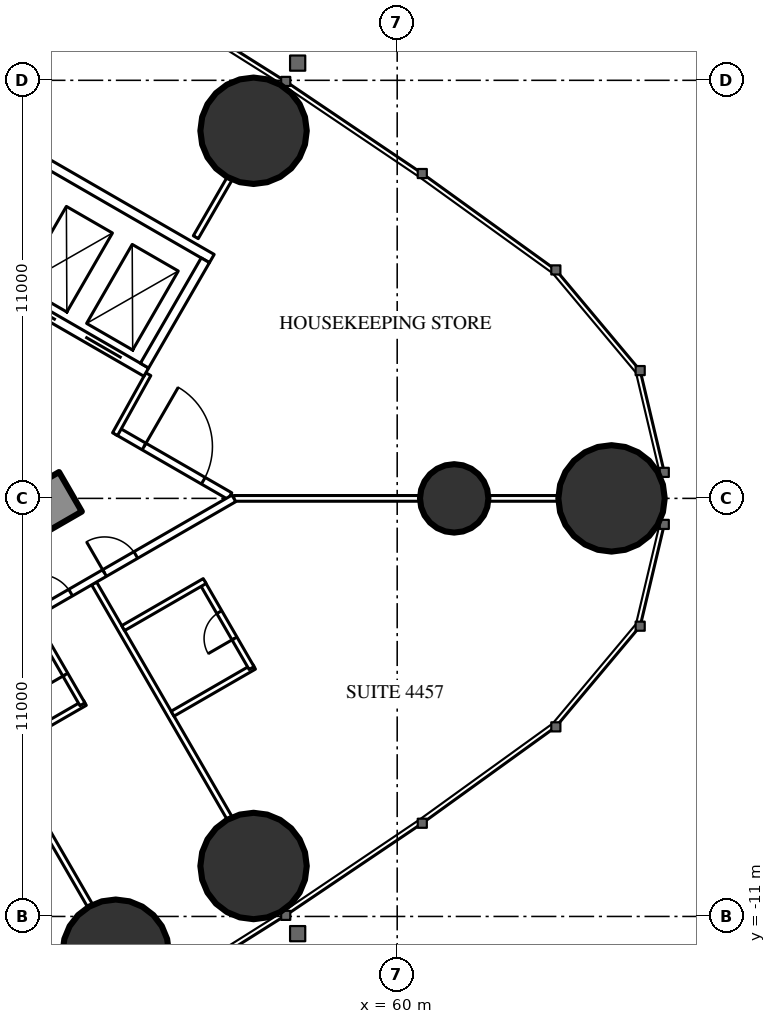
"""IFC4 building model, lengths in metres.
Left out: names, types, materials, properties, quantities, classifications, styles, units other than length and angle.
Written with IfcOpenShell. Run it as: python <this file> out.ifc"""

import sys

from ifc_helpers import new_model, si_unit, direction, frame, frame_2d, origin, origin_2d, place, context, subcontext, project, spatial, rectangle, circle, extrude, element, fill, save


model = new_model("IFC4")
c1 = context("Model", 3, precision=1e-05, world=origin(), true_north=direction((0.0, 1.0)))
c2 = subcontext(c1, "Body", "Model", "MODEL_VIEW")
j1 = project(units=[si_unit("LENGTHUNIT", "METRE"), si_unit("PLANEANGLEUNIT", "RADIAN")], contexts=[c1])
p1 = place(None, origin())
s1 = spatial("IfcSite", under=j1, at=p1, CompositionType="ELEMENT")
p2 = place(p1, origin())
s2 = spatial("IfcBuilding", under=s1, at=p2, CompositionType="ELEMENT")
p3 = place(p2, frame((0.0, 0.0, 166.8)))
s3 = spatial("IfcBuildingStorey", under=s2, at=p3, CompositionType="ELEMENT", Elevation=166.8)
for number, where, z_axis, x_axis in (
    (1, (65.64, 0.0, 0.0), (0.0, 0.0, 1.0), (1.0, 0.0, 0.0)),
    (2, (56.221, 9.672, 0.0), (0.0, 0.0, 1.0), (1.0, 0.0, 0.0)),
    (3, (52.594, -11.955, 0.0), (0.0, 0.0, 1.0), (1.0, 0.0, 0.0)),
    (4, (56.221, -9.672, 0.0), (0.0, 0.0, 1.0), (1.0, 0.0, 0.0)),
):
    element("IfcColumn", number, at=place(p3, frame(where, z_axis=z_axis, x_axis=x_axis)), inside=s3, PredefinedType="COLUMN", context=c2, shape_type="SweptSolid", body=[
        extrude(circle(Radius=1.4, at=origin_2d()), origin(), (0.0, 0.0, 1.0), 3.5),
    ])
p4 = place(p3, frame((61.5, 0.0, 0.0), z_axis=(0.0, 0.0, 1.0), x_axis=(1.0, 0.0, 0.0)))
e5 = element("IfcColumn", 5, at=p4, inside=s3, PredefinedType="COLUMN", context=c2, shape_type="SweptSolid", body=[
    extrude(circle(Radius=0.9, at=origin_2d()), origin(), (0.0, 0.0, 1.0), 3.5),
])
p5 = place(p3, frame((27.2, -13.8, 0.0), z_axis=(0.0, 0.0, 1.0), x_axis=(0.866027159892, 0.499996958321, 0.0)))
e6 = element("IfcWall", 6, at=p5, inside=s3, PredefinedType="SHEAR", context=c2, shape_type="SweptSolid", body=[
    extrude(rectangle(XDim=27.947, YDim=1.2, at=frame_2d((13.973, 0.0))), origin(), (0.0, 0.0, 1.0), 3.5),
])
p6 = place(p5, frame((4.6, 0.0, 0.0)))
e7 = element("IfcOpeningElement", 7, at=p6, cuts=e6, PredefinedType="OPENING", context=c2, shape_type="SweptSolid", body=[
    extrude(rectangle(XDim=1.0, YDim=2.2, at=frame_2d((0.5, 1.1))), frame((0.0, 0.61, 0.0), z_axis=(0.0, -1.0, 0.0), x_axis=(1.0, 0.0, 0.0)), (0.0, 0.0, 1.0), 1.22),
])
p7 = place(p5, frame((13.395, 0.0, 0.0)))
e8 = element("IfcOpeningElement", 8, at=p7, cuts=e6, PredefinedType="OPENING", context=c2, shape_type="SweptSolid", body=[
    extrude(rectangle(XDim=1.8, YDim=2.2, at=frame_2d((0.9, 1.1))), frame((0.0, 0.61, 0.0), z_axis=(0.0, -1.0, 0.0), x_axis=(1.0, 0.0, 0.0)), (0.0, 0.0, 1.0), 1.22),
])
p8 = place(p3, frame((48.275, -4.404, 0.0), z_axis=(0.0, 0.0, 1.0), x_axis=(0.500006004368, -0.866021937133, 0.0)))
e9 = element("IfcWall", 9, at=p8, inside=s3, PredefinedType="PARTITIONING", context=c2, shape_type="SweptSolid", body=[
    extrude(rectangle(XDim=7.279, YDim=0.15, at=frame_2d((3.64, 0.0))), origin(), (0.0, 0.0, 1.0), 2.3),
])
p9 = place(p3, frame((52.025, -2.238, 0.0), z_axis=(0.0, 0.0, 1.0), x_axis=(0.499983785035, -0.866034765296, 0.0)))
e10 = element("IfcWall", 10, at=p9, inside=s3, PredefinedType="PARTITIONING", context=c2, shape_type="SweptSolid", body=[
    extrude(rectangle(XDim=7.116, YDim=0.15, at=frame_2d((3.558, 0.0))), origin(), (0.0, 0.0, 1.0), 2.3),
])
p10 = place(p3, frame((55.702, 0.0, 0.0), z_axis=(0.0, 0.0, 1.0), x_axis=(1.0, 0.0, 0.0)))
e11 = element("IfcWall", 11, at=p10, inside=s3, PredefinedType="PARTITIONING", context=c2, shape_type="SweptSolid", body=[
    extrude(rectangle(XDim=8.518, YDim=0.15, at=frame_2d((4.259, 0.0))), origin(), (0.0, 0.0, 1.0), 2.3),
])
p11 = place(p3, frame((54.7, 6.872, 0.0), z_axis=(0.0, 0.0, 1.0), x_axis=(0.499989690894, 0.866031355668, 0.0)))
e12 = element("IfcWall", 12, at=p11, inside=s3, PredefinedType="PARTITIONING", context=c2, shape_type="SweptSolid", body=[
    extrude(rectangle(XDim=1.766, YDim=0.15, at=frame_2d((0.883, 0.0))), origin(), (0.0, 0.0, 1.0), 3.25),
])
p12 = place(p3, frame((52.639, 1.769, 0.0), z_axis=(0.0, 0.0, 1.0), x_axis=(0.866027340901, -0.4999966448, 0.0)))
e13 = element("IfcWall", 13, at=p12, inside=s3, PredefinedType="PARTITIONING", context=c2, shape_type="SweptSolid", body=[
    extrude(rectangle(XDim=3.417, YDim=0.2, at=frame_2d((1.708, 0.0))), origin(), (0.0, 0.0, 1.0), 3.25),
])
p13 = place(p12, frame((0.809, 0.0, 0.0)))
e14 = element("IfcOpeningElement", 14, at=p13, cuts=e13, PredefinedType="OPENING", context=c2, shape_type="SweptSolid", body=[
    extrude(rectangle(XDim=1.8, YDim=2.2, at=frame_2d((0.9, 1.1))), frame((0.0, 0.11, 0.0), z_axis=(0.0, -1.0, 0.0), x_axis=(1.0, 0.0, 0.0)), (0.0, 0.0, 1.0), 0.22),
])
p14 = place(p3, frame((52.576, 1.689, 0.0), z_axis=(0.0, 0.0, 1.0), x_axis=(0.485424724123, 0.874278466629, 0.0)))
e15 = element("IfcWall", 15, at=p14, inside=s3, PredefinedType="PARTITIONING", context=c2, shape_type="SweptSolid", body=[
    extrude(rectangle(XDim=1.805, YDim=0.15, at=frame_2d((0.903, 0.0))), origin(), (0.0, 0.0, 1.0), 3.25),
])
p15 = place(p3, frame((40.741, -8.638, 0.0), z_axis=(0.0, 0.0, 1.0), x_axis=(0.866022967338, 0.500004220025, 0.0)))
e16 = element("IfcWall", 16, at=p15, inside=s3, PredefinedType="PARTITIONING", context=c2, shape_type="SweptSolid", body=[
    extrude(rectangle(XDim=17.276, YDim=0.2, at=frame_2d((8.638, 0.0))), origin(), (0.0, 0.0, 1.0), 3.25),
])
p16 = place(p15, frame((7.316, 0.0, 0.0)))
e17 = element("IfcOpeningElement", 17, at=p16, cuts=e16, PredefinedType="OPENING", context=c2, shape_type="SweptSolid", body=[
    extrude(rectangle(XDim=0.95, YDim=2.2, at=frame_2d((0.475, 1.1))), frame((0.0, 0.11, 0.0), z_axis=(0.0, -1.0, 0.0), x_axis=(1.0, 0.0, 0.0)), (0.0, 0.0, 1.0), 0.22),
])
p17 = place(p15, frame((11.366, 0.0, 0.0)))
e18 = element("IfcOpeningElement", 18, at=p17, cuts=e16, PredefinedType="OPENING", context=c2, shape_type="SweptSolid", body=[
    extrude(rectangle(XDim=0.95, YDim=2.2, at=frame_2d((0.475, 1.1))), frame((0.0, 0.11, 0.0), z_axis=(0.0, -1.0, 0.0), x_axis=(1.0, 0.0, 0.0)), (0.0, 0.0, 1.0), 0.22),
])
p18 = place(p15, frame((13.347, 0.0, 0.0)))
e19 = element("IfcOpeningElement", 19, at=p18, cuts=e16, PredefinedType="OPENING", context=c2, shape_type="SweptSolid", body=[
    extrude(rectangle(XDim=0.95, YDim=2.2, at=frame_2d((0.475, 1.1))), frame((0.0, 0.11, 0.0), z_axis=(0.0, -1.0, 0.0), x_axis=(1.0, 0.0, 0.0)), (0.0, 0.0, 1.0), 0.22),
])
p19 = place(p3, frame((49.64, -6.618, 0.0), z_axis=(0.0, 0.0, 1.0), x_axis=(0.866006523861, 0.500032699561, 0.0)))
e20 = element("IfcWall", 20, at=p19, inside=s3, PredefinedType="PARTITIONING", context=c2, shape_type="SweptSolid", body=[
    extrude(rectangle(XDim=2.475, YDim=0.15, at=frame_2d((1.237, 0.0))), origin(), (0.0, 0.0, 1.0), 3.25),
])
p20 = place(p3, frame((50.418, -3.166, 0.0), z_axis=(0.0, 0.0, 1.0), x_axis=(0.499936506574, -0.866062058628, 0.0)))
e21 = element("IfcWall", 21, at=p20, inside=s3, PredefinedType="PARTITIONING", context=c2, shape_type="SweptSolid", body=[
    extrude(rectangle(XDim=2.6, YDim=0.15, at=frame_2d((1.3, 0.0))), origin(), (0.0, 0.0, 1.0), 3.25),
])
p21 = place(p20, frame((0.9, 0.0, 0.0)))
e22 = element("IfcOpeningElement", 22, at=p21, cuts=e21, PredefinedType="OPENING", context=c2, shape_type="SweptSolid", body=[
    extrude(rectangle(XDim=0.8, YDim=2.2, at=frame_2d((0.4, 1.1))), frame((0.0, 0.085, 0.0), z_axis=(0.0, -1.0, 0.0), x_axis=(1.0, 0.0, 0.0)), (0.0, 0.0, 1.0), 0.17),
])
p22 = place(p3, frame((54.09, -5.665, 0.0), z_axis=(0.0, 0.0, 1.0), x_axis=(0.866006523861, 0.500032699561, 0.0)))
e23 = element("IfcWall", 23, at=p22, inside=s3, PredefinedType="PARTITIONING", context=c2, shape_type="SweptSolid", body=[
    extrude(rectangle(XDim=2.475, YDim=0.15, at=frame_2d((1.237, 0.0))), origin(), (0.0, 0.0, 1.0), 3.25),
])
p23 = place(p3, frame((54.869, -2.213, 0.0), z_axis=(0.0, 0.0, 1.0), x_axis=(0.500047596559, -0.865997922154, 0.0)))
e24 = element("IfcWall", 24, at=p23, inside=s3, PredefinedType="PARTITIONING", context=c2, shape_type="SweptSolid", body=[
    extrude(rectangle(XDim=2.6, YDim=0.15, at=frame_2d((1.3, 0.0))), origin(), (0.0, 0.0, 1.0), 3.25),
])
p24 = place(p23, frame((0.9, 0.0, 0.0)))
e25 = element("IfcOpeningElement", 25, at=p24, cuts=e24, PredefinedType="OPENING", context=c2, shape_type="SweptSolid", body=[
    extrude(rectangle(XDim=0.8, YDim=2.2, at=frame_2d((0.4, 1.1))), frame((0.0, 0.085, 0.0), z_axis=(0.0, -1.0, 0.0), x_axis=(1.0, 0.0, 0.0)), (0.0, 0.0, 1.0), 0.17),
])
p25 = place(p3, frame((52.79, -3.413, 0.0), z_axis=(0.0, 0.0, 1.0), x_axis=(0.866006523861, 0.500032699561, 0.0)))
e26 = element("IfcWall", 26, at=p25, inside=s3, PredefinedType="PARTITIONING", context=c2, shape_type="SweptSolid", body=[
    extrude(rectangle(XDim=2.475, YDim=0.15, at=frame_2d((1.237, 0.0))), origin(), (0.0, 0.0, 1.0), 3.25),
])
p26 = place(p3, frame((47.681, 6.622, 0.0), z_axis=(0.0, 0.0, 1.0), x_axis=(0.86603344179, -0.499986077507, 0.0)))
e27 = element("IfcWall", 27, at=p26, inside=s3, PredefinedType="PARTITIONING", context=c2, shape_type="SweptSolid", body=[
    extrude(rectangle(XDim=6.6, YDim=0.25, at=frame_2d((3.3, 0.0))), origin(), (0.0, 0.0, 1.0), 3.25),
])
p27 = place(p26, frame((0.75, 0.0, 0.0)))
e28 = element("IfcOpeningElement", 28, at=p27, cuts=e27, PredefinedType="OPENING", context=c2, shape_type="SweptSolid", body=[
    extrude(rectangle(XDim=1.1, YDim=2.2, at=frame_2d((0.55, 1.1))), frame((0.0, 0.135, 0.0), z_axis=(0.0, -1.0, 0.0), x_axis=(1.0, 0.0, 0.0)), (0.0, 0.0, 1.0), 0.27),
])
p28 = place(p26, frame((2.75, 0.0, 0.0)))
e29 = element("IfcOpeningElement", 29, at=p28, cuts=e27, PredefinedType="OPENING", context=c2, shape_type="SweptSolid", body=[
    extrude(rectangle(XDim=1.1, YDim=2.2, at=frame_2d((0.55, 1.1))), frame((0.0, 0.135, 0.0), z_axis=(0.0, -1.0, 0.0), x_axis=(1.0, 0.0, 0.0)), (0.0, 0.0, 1.0), 0.27),
])
p29 = place(p26, frame((4.75, 0.0, 0.0)))
e30 = element("IfcOpeningElement", 30, at=p29, cuts=e27, PredefinedType="OPENING", context=c2, shape_type="SweptSolid", body=[
    extrude(rectangle(XDim=1.1, YDim=2.2, at=frame_2d((0.55, 1.1))), frame((0.0, 0.135, 0.0), z_axis=(0.0, -1.0, 0.0), x_axis=(1.0, 0.0, 0.0)), (0.0, 0.0, 1.0), 0.27),
])
p30 = place(p3, frame((49.406, 9.611, 0.0), z_axis=(0.0, 0.0, 1.0), x_axis=(0.86603344179, -0.499986077507, 0.0)))
e31 = element("IfcWall", 31, at=p30, inside=s3, PredefinedType="PARTITIONING", context=c2, shape_type="SweptSolid", body=[
    extrude(rectangle(XDim=6.6, YDim=0.25, at=frame_2d((3.3, 0.0))), origin(), (0.0, 0.0, 1.0), 3.25),
])
p31 = place(p3, frame((53.352, 3.493, 0.0), z_axis=(0.0, 0.0, 1.0), x_axis=(0.499872130319, 0.866099216793, 0.0)))
e32 = element("IfcWall", 32, at=p31, inside=s3, PredefinedType="PARTITIONING", context=c2, shape_type="SweptSolid", body=[
    extrude(rectangle(XDim=3.2, YDim=0.25, at=frame_2d((1.6, 0.0))), origin(), (0.0, 0.0, 1.0), 3.25),
])
p32 = place(p21, origin())
e33 = element("IfcDoor", 33, at=p32, inside=s3, OperationType="SINGLE_SWING_RIGHT", PredefinedType="DOOR", context=c2, shape_type="SweptSolid", body=[
    extrude(rectangle(XDim=0.8, YDim=2.2, at=frame_2d((0.4, 1.1))), frame((0.0, 0.025, 0.0), z_axis=(0.0, -1.0, 0.0), x_axis=(1.0, 0.0, 0.0)), (0.0, 0.0, 1.0), 0.05),
])
fill(e22, e33)
p33 = place(p17, origin())
e34 = element("IfcDoor", 34, at=p33, inside=s3, OperationType="SINGLE_SWING_LEFT", PredefinedType="DOOR", context=c2, shape_type="SweptSolid", body=[
    extrude(rectangle(XDim=0.95, YDim=2.2, at=frame_2d((0.475, 1.1))), frame((0.0, 0.025, 0.0), z_axis=(0.0, -1.0, 0.0), x_axis=(1.0, 0.0, 0.0)), (0.0, 0.0, 1.0), 0.05),
])
fill(e18, e34)
p34 = place(p24, origin())
e35 = element("IfcDoor", 35, at=p34, inside=s3, OperationType="SINGLE_SWING_RIGHT", PredefinedType="DOOR", context=c2, shape_type="SweptSolid", body=[
    extrude(rectangle(XDim=0.8, YDim=2.2, at=frame_2d((0.4, 1.1))), frame((0.0, 0.025, 0.0), z_axis=(0.0, -1.0, 0.0), x_axis=(1.0, 0.0, 0.0)), (0.0, 0.0, 1.0), 0.05),
])
fill(e25, e35)
p35 = place(p18, origin())
e36 = element("IfcDoor", 36, at=p35, inside=s3, OperationType="SINGLE_SWING_LEFT", PredefinedType="DOOR", context=c2, shape_type="SweptSolid", body=[
    extrude(rectangle(XDim=0.95, YDim=2.2, at=frame_2d((0.475, 1.1))), frame((0.0, 0.025, 0.0), z_axis=(0.0, -1.0, 0.0), x_axis=(1.0, 0.0, 0.0)), (0.0, 0.0, 1.0), 0.05),
])
fill(e19, e36)
p36 = place(p13, origin())
e37 = element("IfcDoor", 37, at=p36, inside=s3, OperationType="DOUBLE_DOOR_SINGLE_SWING", PredefinedType="DOOR", context=c2, shape_type="SweptSolid", body=[
    extrude(rectangle(XDim=1.8, YDim=2.2, at=frame_2d((0.9, 1.1))), frame((0.0, 0.025, 0.0), z_axis=(0.0, -1.0, 0.0), x_axis=(1.0, 0.0, 0.0)), (0.0, 0.0, 1.0), 0.05),
])
fill(e14, e37)
p37 = place(p28, origin())
e38 = element("IfcDoor", 38, at=p37, inside=s3, OperationType="DOUBLE_DOOR_SLIDING", PredefinedType="USERDEFINED", context=c2, shape_type="SweptSolid", body=[
    extrude(rectangle(XDim=1.1, YDim=2.2, at=frame_2d((0.55, 1.1))), frame((0.0, 0.025, 0.0), z_axis=(0.0, -1.0, 0.0), x_axis=(1.0, 0.0, 0.0)), (0.0, 0.0, 1.0), 0.05),
])
fill(e29, e38)
p38 = place(p29, origin())
e39 = element("IfcDoor", 39, at=p38, inside=s3, OperationType="DOUBLE_DOOR_SLIDING", PredefinedType="USERDEFINED", context=c2, shape_type="SweptSolid", body=[
    extrude(rectangle(XDim=1.1, YDim=2.2, at=frame_2d((0.55, 1.1))), frame((0.0, 0.025, 0.0), z_axis=(0.0, -1.0, 0.0), x_axis=(1.0, 0.0, 0.0)), (0.0, 0.0, 1.0), 0.05),
])
fill(e30, e39)
save(model, sys.argv[1])
